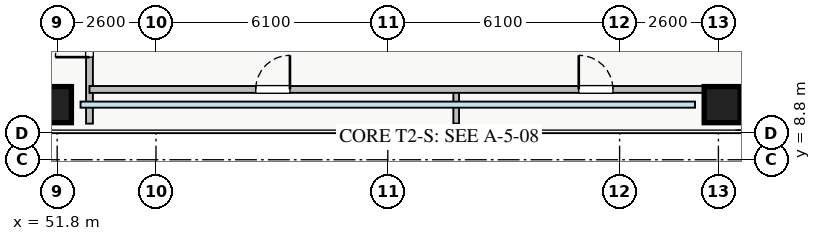
"""IFC4 building model, lengths in metres.
Left out: names, types, materials, properties, quantities, classifications, styles, units other than length and angle.
Written with IfcOpenShell. Run it as: python <this file> out.ifc"""

import sys

from ifc_helpers import new_model, si_unit, direction, frame, frame_2d, origin, origin_2d, place, context, subcontext, project, spatial, rectangle, extrude, source, transform, mapped, element, fill, save


model = new_model("IFC4")
c1 = context("Model", 3, precision=1e-05, world=origin(), true_north=direction((0.0, 1.0)))
c2 = subcontext(c1, "Body", "Model", "MODEL_VIEW")
j1 = project(units=[si_unit("LENGTHUNIT", "METRE"), si_unit("PLANEANGLEUNIT", "RADIAN")], contexts=[c1])
p1 = place(None, origin())
s1 = spatial("IfcSite", under=j1, at=p1, CompositionType="ELEMENT")
p2 = place(p1, origin())
s2 = spatial("IfcBuilding", under=s1, at=p2, CompositionType="ELEMENT")
p3 = place(p2, frame((0.0, 0.0, 29.5)))
s3 = spatial("IfcBuildingStorey", under=s2, at=p3, CompositionType="ELEMENT", Elevation=29.5)
m1 = source(origin(), c2, "Body", "SweptSolid", [
    extrude(rectangle(XDim=0.95, YDim=0.95, at=origin_2d()), origin(), (0.0, 0.0, 1.0), 3.25),
])
for number, where, z_axis, x_axis in (
    (1, (51.7, 10.25, 0.0), (0.0, 0.0, 1.0), (1.0, 0.0, 0.0)),
    (2, (69.3, 10.25, 0.0), (0.0, 0.0, 1.0), (1.0, 0.0, 0.0)),
):
    element("IfcColumn", number, at=place(p3, frame(where, z_axis=z_axis, x_axis=x_axis)), inside=s3, PredefinedType="COLUMN", context=c2, shape_type="MappedRepresentation", body=[
        mapped(m1, transform((0.0, 0.0, 0.0), x_axis=(1.0, 0.0, 0.0), y_axis=(0.0, 1.0, 0.0), z_axis=(0.0, 0.0, 1.0), scale=1.0)),
    ])
p4 = place(p3, frame((52.65, 9.75, 0.0), z_axis=(0.0, 0.0, 1.0), x_axis=(0.0, 1.0, 0.0)))
e3 = element("IfcWall", 3, at=p4, inside=s3, PredefinedType="PARTITIONING", context=c2, shape_type="SweptSolid", body=[
    extrude(rectangle(XDim=26.5, YDim=0.18, at=frame_2d((13.25, 0.0))), origin(), (0.0, 0.0, 1.0), 3.07),
])
p5 = place(p4, frame((23.85, 0.0, 0.0)))
e4 = element("IfcOpeningElement", 4, at=p5, cuts=e3, PredefinedType="OPENING", context=c2, shape_type="SweptSolid", body=[
    extrude(rectangle(XDim=0.9, YDim=2.05, at=frame_2d((0.45, 1.025))), frame((0.0, 0.1, 0.0), z_axis=(0.0, -1.0, 0.0), x_axis=(1.0, 0.0, 0.0)), (0.0, 0.0, 1.0), 0.2),
])
p6 = place(p4, frame((1.75, 0.0, 0.0)))
e5 = element("IfcOpeningElement", 5, at=p6, cuts=e3, PredefinedType="OPENING", context=c2, shape_type="SweptSolid", body=[
    extrude(rectangle(XDim=0.9, YDim=2.05, at=frame_2d((0.45, 1.025))), frame((0.0, 0.1, 0.0), z_axis=(0.0, -1.0, 0.0), x_axis=(1.0, 0.0, 0.0)), (0.0, 0.0, 1.0), 0.2),
])
p7 = place(p4, frame((5.145, 0.0, 0.0)))
e6 = element("IfcOpeningElement", 6, at=p7, cuts=e3, PredefinedType="OPENING", context=c2, shape_type="SweptSolid", body=[
    extrude(rectangle(XDim=1.0, YDim=2.05, at=frame_2d((0.5, 1.025))), frame((0.0, 0.1, 0.0), z_axis=(0.0, -1.0, 0.0), x_axis=(1.0, 0.0, 0.0)), (0.0, 0.0, 1.0), 0.2),
])
p8 = place(p4, frame((14.39, 0.0, 0.0)))
e7 = element("IfcOpeningElement", 7, at=p8, cuts=e3, PredefinedType="OPENING", context=c2, shape_type="SweptSolid", body=[
    extrude(rectangle(XDim=1.0, YDim=2.05, at=frame_2d((0.5, 1.025))), frame((0.0, 0.1, 0.0), z_axis=(0.0, -1.0, 0.0), x_axis=(1.0, 0.0, 0.0)), (0.0, 0.0, 1.0), 0.2),
])
for number, where, z_axis, x_axis in (
    (8, (62.3, 9.75, 0.0), (0.0, 0.0, 1.0), (0.0, 1.0, 0.0)),
    (9, (69.65, 9.75, 0.0), (0.0, 0.0, 1.0), (0.0, 1.0, 0.0)),
):
    element("IfcWall", number, at=place(p3, frame(where, z_axis=z_axis, x_axis=x_axis)), inside=s3, PredefinedType="PARTITIONING", context=c2, shape_type="SweptSolid", body=[
        extrude(rectangle(XDim=0.9, YDim=0.15, at=frame_2d((0.45, 0.0))), origin(), (0.0, 0.0, 1.0), 3.07),
    ])
p9 = place(p3, frame((52.65, 10.65, 0.0), z_axis=(0.0, 0.0, 1.0), x_axis=(1.0, 0.0, 0.0)))
e10 = element("IfcWall", 10, at=p9, inside=s3, PredefinedType="PARTITIONING", context=c2, shape_type="SweptSolid", body=[
    extrude(rectangle(XDim=17.0, YDim=0.18, at=frame_2d((8.5, 0.0))), origin(), (0.0, 0.0, 1.0), 3.07),
])
p10 = place(p9, frame((4.375, 0.0, 0.0)))
e11 = element("IfcOpeningElement", 11, at=p10, cuts=e10, PredefinedType="OPENING", context=c2, shape_type="SweptSolid", body=[
    extrude(rectangle(XDim=0.9, YDim=2.05, at=frame_2d((0.45, 1.025))), frame((0.0, 0.1, 0.0), z_axis=(0.0, -1.0, 0.0), x_axis=(1.0, 0.0, 0.0)), (0.0, 0.0, 1.0), 0.2),
])
p11 = place(p9, frame((12.875, 0.0, 0.0)))
e12 = element("IfcOpeningElement", 12, at=p11, cuts=e10, PredefinedType="OPENING", context=c2, shape_type="SweptSolid", body=[
    extrude(rectangle(XDim=0.9, YDim=2.05, at=frame_2d((0.45, 1.025))), frame((0.0, 0.1, 0.0), z_axis=(0.0, -1.0, 0.0), x_axis=(1.0, 0.0, 0.0)), (0.0, 0.0, 1.0), 0.2),
])
m2 = source(origin(), c2, "Body", "SweptSolid", [
    extrude(rectangle(XDim=0.9, YDim=2.05, at=frame_2d((0.45, 1.025))), frame((0.0, 0.025, 0.0), z_axis=(0.0, -1.0, 0.0), x_axis=(1.0, 0.0, 0.0)), (0.0, 0.0, 1.0), 0.05),
])
p12 = place(p6, origin())
e13 = element("IfcDoor", 13, at=p12, inside=s3, OperationType="SINGLE_SWING_LEFT", PredefinedType="DOOR", context=c2, shape_type="MappedRepresentation", body=[
    mapped(m2, transform((0.0, 0.0, 0.0), x_axis=(1.0, 0.0, 0.0), y_axis=(0.0, 1.0, 0.0), z_axis=(0.0, 0.0, 1.0), scale=1.0)),
])
fill(e5, e13)
p13 = place(p10, origin())
e14 = element("IfcDoor", 14, at=p13, inside=s3, OperationType="SINGLE_SWING_RIGHT", PredefinedType="DOOR", context=c2, shape_type="MappedRepresentation", body=[
    mapped(m2, transform((0.0, 0.0, 0.0), x_axis=(1.0, 0.0, 0.0), y_axis=(0.0, 1.0, 0.0), z_axis=(0.0, 0.0, 1.0), scale=1.0)),
])
fill(e11, e14)
p14 = place(p11, origin())
e15 = element("IfcDoor", 15, at=p14, inside=s3, OperationType="SINGLE_SWING_LEFT", PredefinedType="DOOR", context=c2, shape_type="MappedRepresentation", body=[
    mapped(m2, transform((0.0, 0.0, 0.0), x_axis=(1.0, 0.0, 0.0), y_axis=(0.0, 1.0, 0.0), z_axis=(0.0, 0.0, 1.0), scale=1.0)),
])
fill(e12, e15)
save(model, sys.argv[1])
